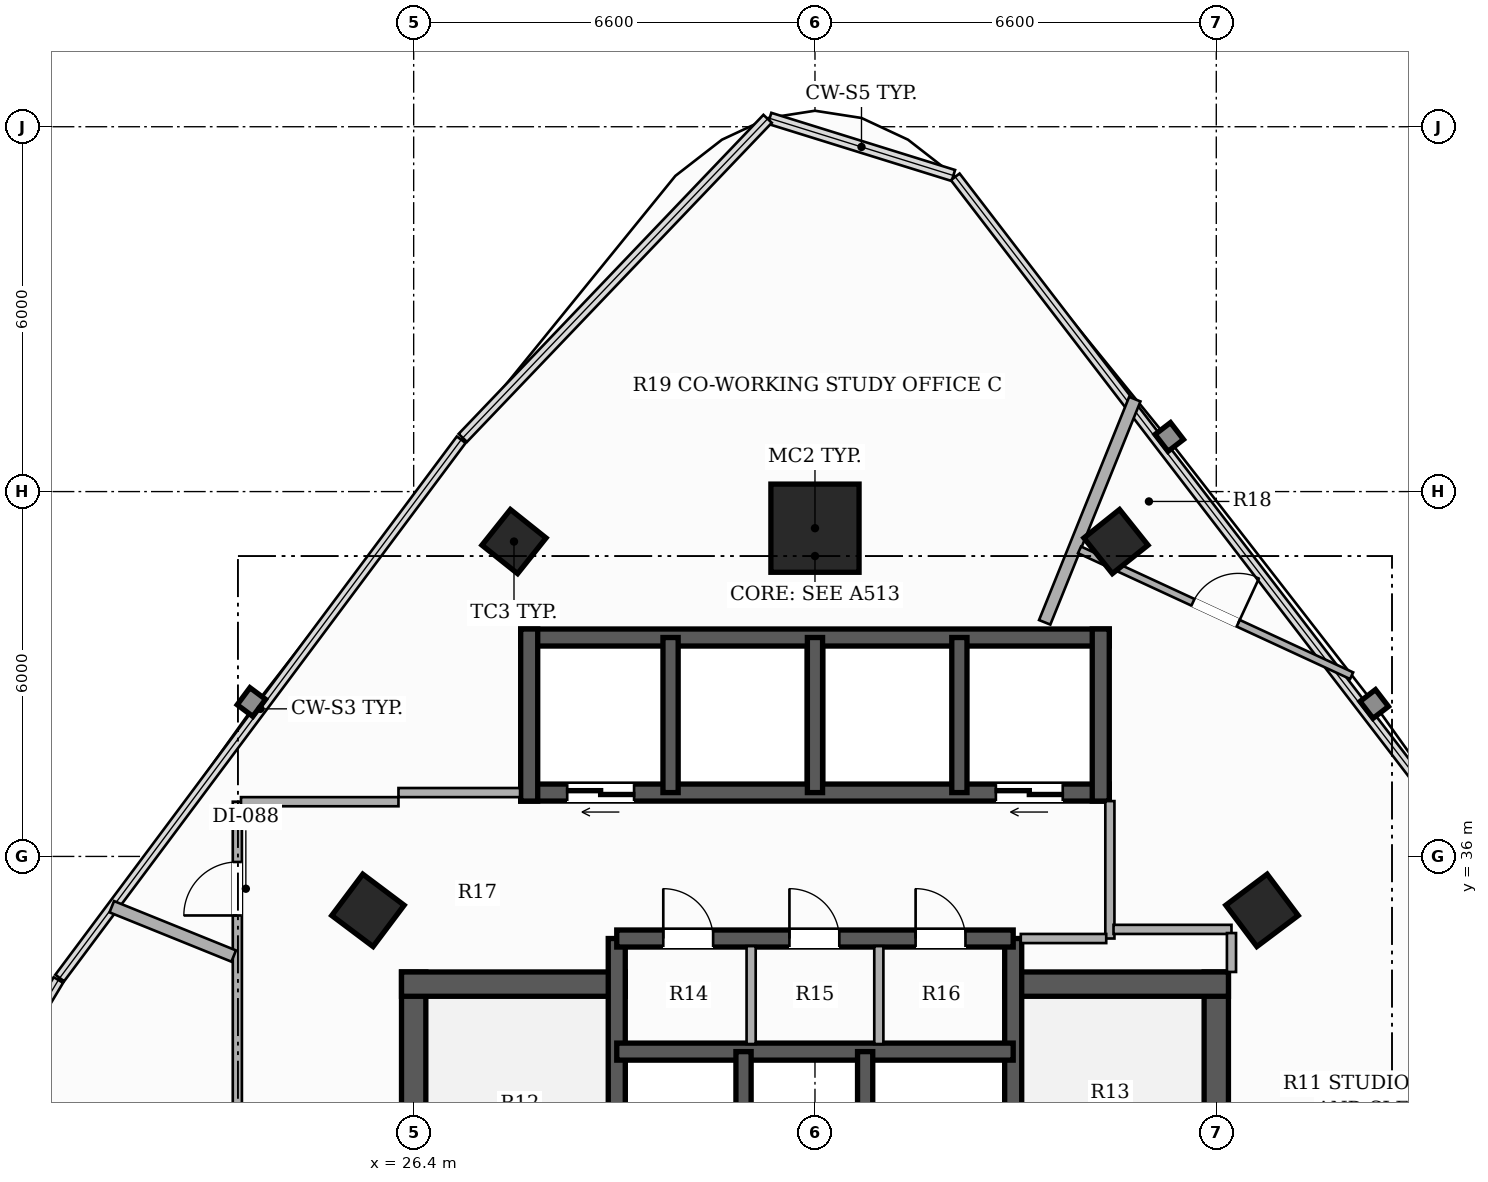
"""IFC4 building model, lengths in metres.
Left out: names, types, materials, properties, quantities, classifications, styles, units other than length and angle.
Written with IfcOpenShell. Run it as: python <this file> out.ifc"""

import sys

from ifc_helpers import new_model, si_unit, direction, frame, frame_2d, origin, origin_2d, place, context, subcontext, project, spatial, rectangle, hollow_rectangle, extrude, element, fill, save


model = new_model("IFC4")
c1 = context("Model", 3, precision=1e-05, world=origin(), true_north=direction((0.0, 1.0)))
c2 = subcontext(c1, "Body", "Model", "MODEL_VIEW")
j1 = project(units=[si_unit("LENGTHUNIT", "METRE"), si_unit("PLANEANGLEUNIT", "RADIAN")], contexts=[c1])
p1 = place(None, origin())
s1 = spatial("IfcSite", under=j1, at=p1, CompositionType="ELEMENT")
p2 = place(p1, origin())
s2 = spatial("IfcBuilding", under=s1, at=p2, CompositionType="ELEMENT")
p3 = place(p2, frame((0.0, 0.0, 153.95)))
s3 = spatial("IfcBuildingStorey", under=s2, at=p3, CompositionType="ELEMENT", Elevation=153.95)
p4 = place(p3, frame((26.4, 26.5, 0.0), z_axis=(0.0, 0.0, 1.0), x_axis=(0.0, 1.0, 0.0)))
e1 = element("IfcWall", 1, at=p4, inside=s3, PredefinedType="SHEAR", context=c2, shape_type="SweptSolid", body=[
    extrude(rectangle(XDim=7.6, YDim=0.4, at=frame_2d((3.8, 0.0))), origin(), (0.0, 0.0, 1.0), 3.3),
])
p5 = place(p3, frame((26.2, 33.9, 0.0), z_axis=(0.0, 0.0, 1.0), x_axis=(1.0, 0.0, 0.0)))
e2 = element("IfcWall", 2, at=p5, inside=s3, PredefinedType="SHEAR", context=c2, shape_type="SweptSolid", body=[
    extrude(rectangle(XDim=3.68, YDim=0.4, at=frame_2d((1.84, 0.0))), origin(), (0.0, 0.0, 1.0), 3.3),
])
p6 = place(p3, frame((39.6, 26.5, 0.0), z_axis=(0.0, 0.0, 1.0), x_axis=(0.0, 1.0, 0.0)))
e3 = element("IfcWall", 3, at=p6, inside=s3, PredefinedType="SHEAR", context=c2, shape_type="SweptSolid", body=[
    extrude(rectangle(XDim=7.6, YDim=0.4, at=frame_2d((3.8, 0.0))), origin(), (0.0, 0.0, 1.0), 3.3),
])
p7 = place(p3, frame((36.12, 33.9, 0.0), z_axis=(0.0, 0.0, 1.0), x_axis=(1.0, 0.0, 0.0)))
e4 = element("IfcWall", 4, at=p7, inside=s3, PredefinedType="SHEAR", context=c2, shape_type="SweptSolid", body=[
    extrude(rectangle(XDim=3.68, YDim=0.4, at=frame_2d((1.84, 0.0))), origin(), (0.0, 0.0, 1.0), 3.3),
])
p8 = place(p3, frame((29.74, 26.5, 0.0), z_axis=(0.0, 0.0, 1.0), x_axis=(0.0, 1.0, 0.0)))
e5 = element("IfcWall", 5, at=p8, inside=s3, PredefinedType="SHEAR", context=c2, shape_type="SweptSolid", body=[
    extrude(rectangle(XDim=8.15, YDim=0.28, at=frame_2d((4.075, 0.0))), origin(), (0.0, 0.0, 1.0), 3.3),
])
p9 = place(p8, frame((0.6, 0.0, 0.0)))
e6 = element("IfcOpeningElement", 6, at=p9, cuts=e5, PredefinedType="OPENING", context=c2, shape_type="SweptSolid", body=[
    extrude(rectangle(XDim=1.05, YDim=2.15, at=frame_2d((0.525, 1.075))), frame((0.0, 0.15, 0.0), z_axis=(0.0, -1.0, 0.0), x_axis=(1.0, 0.0, 0.0)), (0.0, 0.0, 1.0), 0.3),
])
p10 = place(p3, frame((36.26, 26.5, 0.0), z_axis=(0.0, 0.0, 1.0), x_axis=(0.0, 1.0, 0.0)))
e7 = element("IfcWall", 7, at=p10, inside=s3, PredefinedType="SHEAR", context=c2, shape_type="SweptSolid", body=[
    extrude(rectangle(XDim=8.15, YDim=0.28, at=frame_2d((4.075, 0.0))), origin(), (0.0, 0.0, 1.0), 3.3),
])
p11 = place(p10, frame((0.6, 0.0, 0.0)))
e8 = element("IfcOpeningElement", 8, at=p11, cuts=e7, PredefinedType="OPENING", context=c2, shape_type="SweptSolid", body=[
    extrude(rectangle(XDim=1.05, YDim=2.15, at=frame_2d((0.525, 1.075))), frame((0.0, 0.15, 0.0), z_axis=(0.0, -1.0, 0.0), x_axis=(1.0, 0.0, 0.0)), (0.0, 0.0, 1.0), 0.3),
])
p12 = place(p3, frame((29.74, 32.79, 0.0), z_axis=(0.0, 0.0, 1.0), x_axis=(1.0, 0.0, 0.0)))
e9 = element("IfcWall", 9, at=p12, inside=s3, PredefinedType="SHEAR", context=c2, shape_type="SweptSolid", body=[
    extrude(rectangle(XDim=6.52, YDim=0.28, at=frame_2d((3.26, 0.0))), origin(), (0.0, 0.0, 1.0), 3.3),
])
for number, where, z_axis, x_axis in (
    (10, (31.825, 29.89, 0.0), (0.0, 0.0, 1.0), (0.0, 1.0, 0.0)),
    (11, (33.825, 29.89, 0.0), (0.0, 0.0, 1.0), (0.0, 1.0, 0.0)),
):
    element("IfcWall", number, at=place(p3, frame(where, z_axis=z_axis, x_axis=x_axis)), inside=s3, PredefinedType="SHEAR", context=c2, shape_type="SweptSolid", body=[
        extrude(rectangle(XDim=2.9, YDim=0.25, at=frame_2d((1.45, 0.0))), origin(), (0.0, 0.0, 1.0), 3.3),
    ])
p13 = place(p3, frame((29.74, 34.65, 0.0), z_axis=(0.0, 0.0, 1.0), x_axis=(1.0, 0.0, 0.0)))
e12 = element("IfcWall", 12, at=p13, inside=s3, PredefinedType="SHEAR", context=c2, shape_type="SweptSolid", body=[
    extrude(rectangle(XDim=6.52, YDim=0.28, at=frame_2d((3.26, 0.0))), origin(), (0.0, 0.0, 1.0), 3.3),
])
p14 = place(p13, frame((0.765, 0.0, 0.0)))
e13 = element("IfcOpeningElement", 13, at=p14, cuts=e12, PredefinedType="OPENING", context=c2, shape_type="SweptSolid", body=[
    extrude(rectangle(XDim=0.82, YDim=2.1, at=frame_2d((0.41, 1.05))), frame((0.0, 0.15, 0.0), z_axis=(0.0, -1.0, 0.0), x_axis=(1.0, 0.0, 0.0)), (0.0, 0.0, 1.0), 0.3),
])
p15 = place(p13, frame((2.84, 0.0, 0.0)))
e14 = element("IfcOpeningElement", 14, at=p15, cuts=e12, PredefinedType="OPENING", context=c2, shape_type="SweptSolid", body=[
    extrude(rectangle(XDim=0.82, YDim=2.1, at=frame_2d((0.41, 1.05))), frame((0.0, 0.15, 0.0), z_axis=(0.0, -1.0, 0.0), x_axis=(1.0, 0.0, 0.0)), (0.0, 0.0, 1.0), 0.3),
])
p16 = place(p13, frame((4.915, 0.0, 0.0)))
e15 = element("IfcOpeningElement", 15, at=p16, cuts=e12, PredefinedType="OPENING", context=c2, shape_type="SweptSolid", body=[
    extrude(rectangle(XDim=0.82, YDim=2.1, at=frame_2d((0.41, 1.05))), frame((0.0, 0.15, 0.0), z_axis=(0.0, -1.0, 0.0), x_axis=(1.0, 0.0, 0.0)), (0.0, 0.0, 1.0), 0.3),
])
p17 = place(p3, frame((37.84, 37.05, 0.0), z_axis=(0.0, 0.0, 1.0), x_axis=(-1.0, 0.0, 0.0)))
e16 = element("IfcWall", 16, at=p17, inside=s3, PredefinedType="SHEAR", context=c2, shape_type="SweptSolid", body=[
    extrude(rectangle(XDim=9.68, YDim=0.28, at=frame_2d((4.84, 0.0))), origin(), (0.0, 0.0, 1.0), 3.3),
])
p18 = place(p17, frame((7.815, 0.0, 0.0)))
e17 = element("IfcOpeningElement", 17, at=p18, cuts=e16, PredefinedType="OPENING", context=c2, shape_type="SweptSolid", body=[
    extrude(rectangle(XDim=1.1, YDim=2.2, at=frame_2d((0.55, 1.1))), frame((0.0, 0.15, 0.0), z_axis=(0.0, -1.0, 0.0), x_axis=(1.0, 0.0, 0.0)), (0.0, 0.0, 1.0), 0.3),
])
p19 = place(p17, frame((0.765, 0.0, 0.0)))
e18 = element("IfcOpeningElement", 18, at=p19, cuts=e16, PredefinedType="OPENING", context=c2, shape_type="SweptSolid", body=[
    extrude(rectangle(XDim=1.1, YDim=2.2, at=frame_2d((0.55, 1.1))), frame((0.0, 0.15, 0.0), z_axis=(0.0, -1.0, 0.0), x_axis=(1.0, 0.0, 0.0)), (0.0, 0.0, 1.0), 0.3),
])
p20 = place(p3, frame((28.16, 39.6, 0.0), z_axis=(0.0, 0.0, 1.0), x_axis=(1.0, 0.0, 0.0)))
e19 = element("IfcWall", 19, at=p20, inside=s3, PredefinedType="SHEAR", context=c2, shape_type="SweptSolid", body=[
    extrude(rectangle(XDim=9.68, YDim=0.28, at=frame_2d((4.84, 0.0))), origin(), (0.0, 0.0, 1.0), 3.3),
])
for number, where, z_axis, x_axis in (
    (20, (28.3, 36.91, 0.0), (0.0, 0.0, 1.0), (0.0, 1.0, 0.0)),
    (21, (37.7, 36.91, 0.0), (0.0, 0.0, 1.0), (0.0, 1.0, 0.0)),
):
    element("IfcWall", number, at=place(p3, frame(where, z_axis=z_axis, x_axis=x_axis)), inside=s3, PredefinedType="SHEAR", context=c2, shape_type="SweptSolid", body=[
        extrude(rectangle(XDim=2.83, YDim=0.28, at=frame_2d((1.415, 0.0))), origin(), (0.0, 0.0, 1.0), 3.3),
    ])
for number, where, z_axis, x_axis in (
    (22, (30.625, 37.05, 0.0), (0.0, 0.0, 1.0), (0.0, 1.0, 0.0)),
    (23, (33.0, 37.05, 0.0), (0.0, 0.0, 1.0), (0.0, 1.0, 0.0)),
    (24, (35.375, 37.05, 0.0), (0.0, 0.0, 1.0), (0.0, 1.0, 0.0)),
):
    element("IfcWall", number, at=place(p3, frame(where, z_axis=z_axis, x_axis=x_axis)), inside=s3, PredefinedType="SHEAR", context=c2, shape_type="SweptSolid", body=[
        extrude(rectangle(XDim=2.55, YDim=0.25, at=frame_2d((1.275, 0.0))), origin(), (0.0, 0.0, 1.0), 3.3),
    ])
p21 = place(p3, frame((33.0, 41.398, 0.0), z_axis=(0.0, 0.0, 1.0), x_axis=(1.0, 0.0, 0.0)))
e25 = element("IfcColumn", 25, at=p21, inside=s3, PredefinedType="COLUMN", context=c2, shape_type="SweptSolid", body=[
    extrude(hollow_rectangle(XDim=1.45, YDim=1.45, WallThickness=0.045, at=origin_2d()), origin(), (0.0, 0.0, 1.0), 3.3),
])
for number, where, z_axis, x_axis in (
    (26, (25.648, 35.113, 0.0), (0.0, 0.0, 1.0), (0.6, 0.8, 0.0)),
    (27, (40.352, 35.113, 0.0), (0.0, 0.0, 1.0), (-0.6, 0.8, 0.0)),
):
    element("IfcColumn", number, at=place(p3, frame(where, z_axis=z_axis, x_axis=x_axis)), inside=s3, PredefinedType="COLUMN", context=c2, shape_type="SweptSolid", body=[
        extrude(hollow_rectangle(XDim=0.85, YDim=0.85, WallThickness=0.028, at=origin_2d()), origin(), (0.0, 0.0, 1.0), 3.3),
    ])
for number, where, z_axis, x_axis in (
    (28, (28.05, 41.178, 0.0), (0.0, 0.0, 1.0), (0.624, 0.782, 0.0)),
    (29, (37.95, 41.178, 0.0), (0.0, 0.0, 1.0), (-0.624, 0.782, 0.0)),
):
    element("IfcColumn", number, at=place(p3, frame(where, z_axis=z_axis, x_axis=x_axis)), inside=s3, PredefinedType="COLUMN", context=c2, shape_type="SweptSolid", body=[
        extrude(hollow_rectangle(XDim=0.75, YDim=0.75, WallThickness=0.025, at=origin_2d()), origin(), (0.0, 0.0, 1.0), 3.3),
    ])
p22 = place(p3, frame((37.85, 34.65, 0.0), z_axis=(0.0, 0.0, 1.0), x_axis=(0.0, 1.0, 0.0)))
e30 = element("IfcWall", 30, at=p22, inside=s3, PredefinedType="PARTITIONING", context=c2, shape_type="SweptSolid", body=[
    extrude(rectangle(XDim=2.26, YDim=0.15, at=frame_2d((1.13, 0.0))), origin(), (0.0, 0.0, 1.0), 3.06),
])
p23 = place(p3, frame((36.385, 34.65, 0.0), z_axis=(0.0, 0.0, 1.0), x_axis=(1.0, 0.0, 0.0)))
e31 = element("IfcWall", 31, at=p23, inside=s3, PredefinedType="PARTITIONING", context=c2, shape_type="SweptSolid", body=[
    extrude(rectangle(XDim=1.405, YDim=0.15, at=frame_2d((0.703, 0.0))), origin(), (0.0, 0.0, 1.0), 2.425),
])
for number, where, z_axis, x_axis in (
    (32, (31.95, 32.915, 0.0), (0.0, 0.0, 1.0), (0.0, 1.0, 0.0)),
    (33, (34.05, 32.915, 0.0), (0.0, 0.0, 1.0), (0.0, 1.0, 0.0)),
):
    element("IfcWall", number, at=place(p3, frame(where, z_axis=z_axis, x_axis=x_axis)), inside=s3, PredefinedType="PARTITIONING", context=c2, shape_type="SweptSolid", body=[
        extrude(rectangle(XDim=1.61, YDim=0.15, at=frame_2d((0.805, 0.0))), origin(), (0.0, 0.0, 1.0), 3.06),
    ])
p24 = place(p3, frame((23.5, 14.06, 0.0), z_axis=(0.0, 0.0, 1.0), x_axis=(0.0, 1.0, 0.0)))
e34 = element("IfcWall", 34, at=p24, inside=s3, PredefinedType="PARTITIONING", context=c2, shape_type="SweptSolid", body=[
    extrude(rectangle(XDim=22.84, YDim=0.15, at=frame_2d((11.42, 0.0))), origin(), (0.0, 0.0, 1.0), 2.413),
])
p25 = place(p24, frame((8.172, 0.0, 0.0)))
e35 = element("IfcOpeningElement", 35, at=p25, cuts=e34, PredefinedType="OPENING", context=c2, shape_type="SweptSolid", body=[
    extrude(rectangle(XDim=0.88, YDim=2.1, at=frame_2d((0.44, 1.05))), frame((0.0, 0.085, 0.0), z_axis=(0.0, -1.0, 0.0), x_axis=(1.0, 0.0, 0.0)), (0.0, 0.0, 1.0), 0.17),
])
p26 = place(p24, frame((20.969, 0.0, 0.0)))
e36 = element("IfcOpeningElement", 36, at=p26, cuts=e34, PredefinedType="OPENING", context=c2, shape_type="SweptSolid", body=[
    extrude(rectangle(XDim=0.88, YDim=2.1, at=frame_2d((0.44, 1.05))), frame((0.0, 0.085, 0.0), z_axis=(0.0, -1.0, 0.0), x_axis=(1.0, 0.0, 0.0)), (0.0, 0.0, 1.0), 0.17),
])
p27 = place(p24, frame((15.484, 0.0, 0.0)))
e37 = element("IfcOpeningElement", 37, at=p27, cuts=e34, PredefinedType="OPENING", context=c2, shape_type="SweptSolid", body=[
    extrude(rectangle(XDim=0.88, YDim=2.1, at=frame_2d((0.44, 1.05))), frame((0.0, 0.085, 0.0), z_axis=(0.0, -1.0, 0.0), x_axis=(1.0, 0.0, 0.0)), (0.0, 0.0, 1.0), 0.17),
])
p28 = place(p3, frame((23.56, 36.9, 0.0), z_axis=(0.0, 0.0, 1.0), x_axis=(1.0, 0.0, 0.0)))
e38 = element("IfcWall", 38, at=p28, inside=s3, PredefinedType="PARTITIONING", context=c2, shape_type="SweptSolid", body=[
    extrude(rectangle(XDim=2.59, YDim=0.15, at=frame_2d((1.295, 0.0))), origin(), (0.0, 0.0, 1.0), 2.413),
])
p29 = place(p3, frame((26.15, 37.05, 0.0), z_axis=(0.0, 0.0, 1.0), x_axis=(1.0, 0.0, 0.0)))
e39 = element("IfcWall", 39, at=p29, inside=s3, PredefinedType="PARTITIONING", context=c2, shape_type="SweptSolid", body=[
    extrude(rectangle(XDim=2.0, YDim=0.15, at=frame_2d((1.0, 0.0))), origin(), (0.0, 0.0, 1.0), 2.413),
])
p30 = place(p3, frame((37.91, 34.8, 0.0), z_axis=(0.0, 0.0, 1.0), x_axis=(1.0, 0.0, 0.0)))
e40 = element("IfcWall", 40, at=p30, inside=s3, PredefinedType="PARTITIONING", context=c2, shape_type="SweptSolid", body=[
    extrude(rectangle(XDim=1.94, YDim=0.15, at=frame_2d((0.97, 0.0))), origin(), (0.0, 0.0, 1.0), 2.721),
])
p31 = place(p3, frame((39.85, 34.74, 0.0), z_axis=(0.0, 0.0, 1.0), x_axis=(0.0, -1.0, 0.0)))
e41 = element("IfcWall", 41, at=p31, inside=s3, PredefinedType="PARTITIONING", context=c2, shape_type="SweptSolid", body=[
    extrude(rectangle(XDim=0.64, YDim=0.15, at=frame_2d((0.32, 0.0))), origin(), (0.0, 0.0, 1.0), 2.721),
])
p32 = place(p3, frame((36.778, 39.85, 0.0), z_axis=(0.0, 0.0, 1.0), x_axis=(0.374430412004, 0.927255017008, 0.0)))
e42 = element("IfcWall", 42, at=p32, inside=s3, PredefinedType="PARTITIONING", context=c2, shape_type="SweptSolid", body=[
    extrude(rectangle(XDim=3.958, YDim=0.2, at=frame_2d((1.979, 0.0))), origin(), (0.0, 0.0, 1.0), 2.413),
])
p33 = place(p3, frame((23.44, 34.362, 0.0), z_axis=(0.0, 0.0, 1.0), x_axis=(-0.927021575741, 0.375007997395, 0.0)))
e43 = element("IfcWall", 43, at=p33, inside=s3, PredefinedType="PARTITIONING", context=c2, shape_type="SweptSolid", body=[
    extrude(rectangle(XDim=2.163, YDim=0.2, at=frame_2d((1.081, 0.0))), origin(), (0.0, 0.0, 1.0), 3.06),
])
p34 = place(p3, frame((37.351, 41.042, 0.0), z_axis=(0.0, 0.0, 1.0), x_axis=(0.907592371503, -0.419852458834, 0.0)))
e44 = element("IfcWall", 44, at=p34, inside=s3, PredefinedType="PARTITIONING", context=c2, shape_type="SweptSolid", body=[
    extrude(rectangle(XDim=4.93, YDim=0.12, at=frame_2d((2.465, 0.0))), origin(), (0.0, 0.0, 1.0), 2.413),
])
p35 = place(p34, frame((2.055, 0.0, 0.0)))
e45 = element("IfcOpeningElement", 45, at=p35, cuts=e44, PredefinedType="OPENING", context=c2, shape_type="SweptSolid", body=[
    extrude(rectangle(XDim=0.82, YDim=2.1, at=frame_2d((0.41, 1.05))), frame((0.0, 0.07, 0.0), z_axis=(0.0, -1.0, 0.0), x_axis=(1.0, 0.0, 0.0)), (0.0, 0.0, 1.0), 0.14),
])
p36 = place(p18, origin())
e46 = element("IfcDoor", 46, at=p36, inside=s3, OperationType="DOUBLE_DOOR_SLIDING", PredefinedType="DOOR", context=c2, shape_type="SweptSolid", body=[
    extrude(rectangle(XDim=1.1, YDim=2.2, at=frame_2d((0.55, 1.1))), frame((0.0, 0.025, 0.0), z_axis=(0.0, -1.0, 0.0), x_axis=(1.0, 0.0, 0.0)), (0.0, 0.0, 1.0), 0.05),
])
fill(e17, e46)
p37 = place(p19, origin())
e47 = element("IfcDoor", 47, at=p37, inside=s3, OperationType="DOUBLE_DOOR_SLIDING", PredefinedType="DOOR", context=c2, shape_type="SweptSolid", body=[
    extrude(rectangle(XDim=1.1, YDim=2.2, at=frame_2d((0.55, 1.1))), frame((0.0, 0.025, 0.0), z_axis=(0.0, -1.0, 0.0), x_axis=(1.0, 0.0, 0.0)), (0.0, 0.0, 1.0), 0.05),
])
fill(e18, e47)
p38 = place(p14, origin())
e48 = element("IfcDoor", 48, at=p38, inside=s3, OperationType="SINGLE_SWING_LEFT", PredefinedType="DOOR", context=c2, shape_type="SweptSolid", body=[
    extrude(rectangle(XDim=0.82, YDim=2.1, at=frame_2d((0.41, 1.05))), frame((0.0, 0.025, 0.0), z_axis=(0.0, -1.0, 0.0), x_axis=(1.0, 0.0, 0.0)), (0.0, 0.0, 1.0), 0.05),
])
fill(e13, e48)
p39 = place(p15, origin())
e49 = element("IfcDoor", 49, at=p39, inside=s3, OperationType="SINGLE_SWING_LEFT", PredefinedType="DOOR", context=c2, shape_type="SweptSolid", body=[
    extrude(rectangle(XDim=0.82, YDim=2.1, at=frame_2d((0.41, 1.05))), frame((0.0, 0.025, 0.0), z_axis=(0.0, -1.0, 0.0), x_axis=(1.0, 0.0, 0.0)), (0.0, 0.0, 1.0), 0.05),
])
fill(e14, e49)
p40 = place(p16, origin())
e50 = element("IfcDoor", 50, at=p40, inside=s3, OperationType="SINGLE_SWING_LEFT", PredefinedType="DOOR", context=c2, shape_type="SweptSolid", body=[
    extrude(rectangle(XDim=0.82, YDim=2.1, at=frame_2d((0.41, 1.05))), frame((0.0, 0.025, 0.0), z_axis=(0.0, -1.0, 0.0), x_axis=(1.0, 0.0, 0.0)), (0.0, 0.0, 1.0), 0.05),
])
fill(e15, e50)
p41 = place(p35, origin())
e51 = element("IfcDoor", 51, at=p41, inside=s3, OperationType="SINGLE_SWING_RIGHT", PredefinedType="DOOR", context=c2, shape_type="SweptSolid", body=[
    extrude(rectangle(XDim=0.82, YDim=2.1, at=frame_2d((0.41, 1.05))), frame((0.0, 0.025, 0.0), z_axis=(0.0, -1.0, 0.0), x_axis=(1.0, 0.0, 0.0)), (0.0, 0.0, 1.0), 0.05),
])
fill(e45, e51)
p42 = place(p26, origin())
e52 = element("IfcDoor", 52, at=p42, inside=s3, OperationType="SINGLE_SWING_LEFT", PredefinedType="DOOR", context=c2, shape_type="SweptSolid", body=[
    extrude(rectangle(XDim=0.88, YDim=2.1, at=frame_2d((0.44, 1.05))), frame((0.0, 0.025, 0.0), z_axis=(0.0, -1.0, 0.0), x_axis=(1.0, 0.0, 0.0)), (0.0, 0.0, 1.0), 0.05),
])
fill(e36, e52)
save(model, sys.argv[1])
